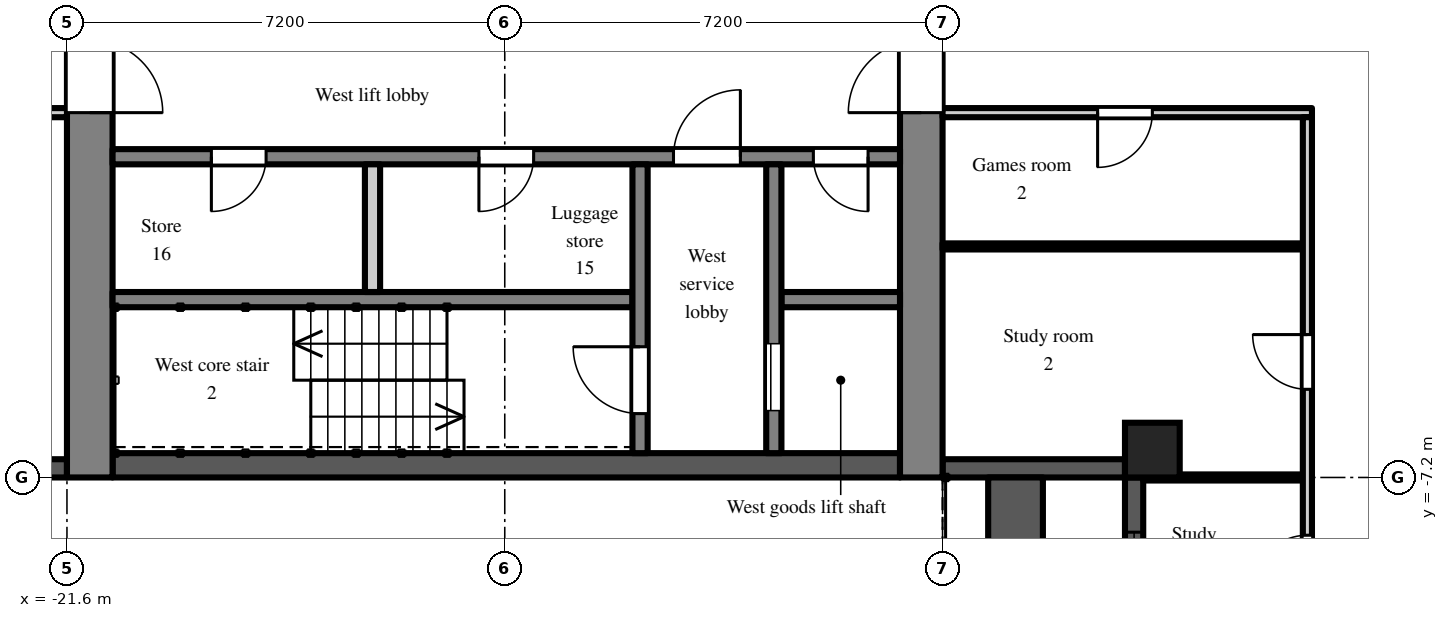
"""IFC4 building model, lengths in metres.
Left out: names, types, materials, properties, quantities, classifications, styles, units other than length and angle.
Written with IfcOpenShell. Run it as: python <this file> out.ifc"""

import sys

from ifc_helpers import new_model, si_unit, direction, frame, frame_2d, origin, origin_2d, place, context, subcontext, project, spatial, rectangle, extrude, element, fill, save


model = new_model("IFC4")
c1 = context("Model", 3, precision=1e-05, world=origin(), true_north=direction((0.0, 1.0)))
c2 = subcontext(c1, "Body", "Model", "MODEL_VIEW")
j1 = project(units=[si_unit("LENGTHUNIT", "METRE"), si_unit("PLANEANGLEUNIT", "RADIAN")], contexts=[c1])
p1 = place(None, origin())
s1 = spatial("IfcSite", under=j1, at=p1, CompositionType="ELEMENT")
p2 = place(p1, origin())
s2 = spatial("IfcBuilding", under=s1, at=p2, CompositionType="ELEMENT")
p3 = place(p2, frame((0.0, 0.0, 198.9)))
s3 = spatial("IfcBuildingStorey", under=s2, at=p3, CompositionType="ELEMENT", Elevation=198.9)
p4 = place(p3, frame((-3.75, -6.75, 0.0), z_axis=(0.0, 0.0, 1.0), x_axis=(1.0, 0.0, 0.0)))
e1 = element("IfcColumn", 1, at=p4, inside=s3, PredefinedType="COLUMN", context=c2, shape_type="SweptSolid", body=[
    extrude(rectangle(XDim=0.9, YDim=0.9, at=origin_2d()), origin(), (0.0, 0.0, 1.0), 3.0),
])
p5 = place(p3, frame((-24.3, -7.05, 0.0), z_axis=(0.0, 0.0, 1.0), x_axis=(1.0, 0.0, 0.0)))
e2 = element("IfcWall", 2, at=p5, inside=s3, PredefinedType="SOLIDWALL", context=c2, shape_type="SweptSolid", body=[
    extrude(rectangle(XDim=2.7, YDim=0.3, at=frame_2d((1.35, 0.0))), origin(), (0.0, 0.0, 1.0), 2.3),
])
p6 = place(p5, frame((0.75, 0.0, 0.2)))
e3 = element("IfcOpeningElement", 3, at=p6, cuts=e2, PredefinedType="OPENING", context=c2, shape_type="SweptSolid", body=[
    extrude(rectangle(XDim=1.2, YDim=1.85, at=frame_2d((0.6, 0.925))), frame((0.0, 0.16, 0.0), z_axis=(0.0, -1.0, 0.0), x_axis=(1.0, 0.0, 0.0)), (0.0, 0.0, 1.0), 0.32),
])
p7 = place(p3, frame((-7.2, -7.05, 0.0), z_axis=(0.0, 0.0, 1.0), x_axis=(1.0, 0.0, 0.0)))
e4 = element("IfcWall", 4, at=p7, inside=s3, PredefinedType="SOLIDWALL", context=c2, shape_type="SweptSolid", body=[
    extrude(rectangle(XDim=3.0, YDim=0.3, at=frame_2d((1.5, 0.0))), origin(), (0.0, 0.0, 1.0), 2.3),
])
p8 = place(p3, frame((-4.05, -7.2, 0.0), z_axis=(0.0, 0.0, 1.0), x_axis=(0.0, -1.0, 0.0)))
e5 = element("IfcWall", 5, at=p8, inside=s3, PredefinedType="SOLIDWALL", context=c2, shape_type="SweptSolid", body=[
    extrude(rectangle(XDim=7.2, YDim=0.3, at=frame_2d((3.6, 0.0))), origin(), (0.0, 0.0, 1.0), 2.3),
])
p9 = place(p8, frame((3.0, 0.0, 0.0)))
e6 = element("IfcOpeningElement", 6, at=p9, cuts=e5, PredefinedType="OPENING", context=c2, shape_type="SweptSolid", body=[
    extrude(rectangle(XDim=1.2, YDim=2.05, at=frame_2d((0.6, 1.025))), frame((0.0, 0.16, 0.0), z_axis=(0.0, -1.0, 0.0), x_axis=(1.0, 0.0, 0.0)), (0.0, 0.0, 1.0), 0.32),
])
p10 = place(p8, frame((0.9, 0.0, 0.2)))
e7 = element("IfcOpeningElement", 7, at=p10, cuts=e5, PredefinedType="OPENING", context=c2, shape_type="SweptSolid", body=[
    extrude(rectangle(XDim=1.8, YDim=1.85, at=frame_2d((0.9, 0.925))), frame((0.0, 0.16, 0.0), z_axis=(0.0, -1.0, 0.0), x_axis=(1.0, 0.0, 0.0)), (0.0, 0.0, 1.0), 0.32),
])
p11 = place(p8, frame((4.5, 0.0, 0.2)))
e8 = element("IfcOpeningElement", 8, at=p11, cuts=e5, PredefinedType="OPENING", context=c2, shape_type="SweptSolid", body=[
    extrude(rectangle(XDim=1.8, YDim=1.85, at=frame_2d((0.9, 0.925))), frame((0.0, 0.16, 0.0), z_axis=(0.0, -1.0, 0.0), x_axis=(1.0, 0.0, 0.0)), (0.0, 0.0, 1.0), 0.32),
])
p12 = place(p3, frame((-6.0, -14.4, 0.0), z_axis=(0.0, 0.0, 1.0), x_axis=(0.0, 1.0, 0.0)))
e9 = element("IfcWall", 9, at=p12, inside=s3, PredefinedType="PARAPET", context=c2, shape_type="SweptSolid", body=[
    extrude(rectangle(XDim=7.2, YDim=0.9, at=frame_2d((3.6, 0.0))), origin(), (0.0, 0.0, 1.0), 0.8),
])
p13 = place(p3, frame((-7.55, -7.2, 0.0), z_axis=(0.0, 0.0, 1.0), x_axis=(0.0, 1.0, 0.0)))
e10 = element("IfcWall", 10, at=p13, inside=s3, PredefinedType="SHEAR", context=c2, shape_type="SweptSolid", body=[
    extrude(rectangle(XDim=14.4, YDim=0.7, at=frame_2d((7.2, 0.0))), origin(), (0.0, 0.0, 1.0), 2.6),
])
p14 = place(p13, frame((6.0, 0.0, 0.0)))
e11 = element("IfcOpeningElement", 11, at=p14, cuts=e10, PredefinedType="OPENING", context=c2, shape_type="SweptSolid", body=[
    extrude(rectangle(XDim=2.4, YDim=2.2, at=frame_2d((1.2, 1.1))), frame((0.0, 0.36, 0.0), z_axis=(0.0, -1.0, 0.0), x_axis=(1.0, 0.0, 0.0)), (0.0, 0.0, 1.0), 0.72),
])
p15 = place(p3, frame((-21.225, -7.2, 0.0), z_axis=(0.0, 0.0, 1.0), x_axis=(0.0, 1.0, 0.0)))
e12 = element("IfcWall", 12, at=p15, inside=s3, PredefinedType="SHEAR", context=c2, shape_type="SweptSolid", body=[
    extrude(rectangle(XDim=14.4, YDim=0.75, at=frame_2d((7.2, 0.0))), origin(), (0.0, 0.0, 1.0), 2.6),
])
p16 = place(p15, frame((6.0, 0.0, 0.0)))
e13 = element("IfcOpeningElement", 13, at=p16, cuts=e12, PredefinedType="OPENING", context=c2, shape_type="SweptSolid", body=[
    extrude(rectangle(XDim=2.4, YDim=2.2, at=frame_2d((1.2, 1.1))), frame((0.0, 0.385, 0.0), z_axis=(0.0, -1.0, 0.0), x_axis=(1.0, 0.0, 0.0)), (0.0, 0.0, 1.0), 0.77),
])
p17 = place(p3, frame((-7.9, -7.0, 0.0), z_axis=(0.0, 0.0, 1.0), x_axis=(-1.0, 0.0, 0.0)))
e14 = element("IfcWall", 14, at=p17, inside=s3, PredefinedType="SHEAR", context=c2, shape_type="SweptSolid", body=[
    extrude(rectangle(XDim=12.95, YDim=0.4, at=frame_2d((6.475, 0.0))), origin(), (0.0, 0.0, 1.0), 2.6),
])
p18 = place(p3, frame((-7.9, -1.925, 0.0), z_axis=(0.0, 0.0, 1.0), x_axis=(-1.0, 0.0, 0.0)))
e15 = element("IfcWall", 15, at=p18, inside=s3, PredefinedType="SHEAR", context=c2, shape_type="SweptSolid", body=[
    extrude(rectangle(XDim=12.95, YDim=0.25, at=frame_2d((6.475, 0.0))), origin(), (0.0, 0.0, 1.0), 2.6),
])
p19 = place(p18, frame((0.525, 0.0, 0.0)))
e16 = element("IfcOpeningElement", 16, at=p19, cuts=e15, PredefinedType="OPENING", context=c2, shape_type="SweptSolid", body=[
    extrude(rectangle(XDim=0.9, YDim=2.1, at=frame_2d((0.45, 1.05))), frame((0.0, 0.135, 0.0), z_axis=(0.0, -1.0, 0.0), x_axis=(1.0, 0.0, 0.0)), (0.0, 0.0, 1.0), 0.27),
])
p20 = place(p18, frame((2.625, 0.0, 0.0)))
e17 = element("IfcOpeningElement", 17, at=p20, cuts=e15, PredefinedType="OPENING", context=c2, shape_type="SweptSolid", body=[
    extrude(rectangle(XDim=1.1, YDim=2.1, at=frame_2d((0.55, 1.05))), frame((0.0, 0.135, 0.0), z_axis=(0.0, -1.0, 0.0), x_axis=(1.0, 0.0, 0.0)), (0.0, 0.0, 1.0), 0.27),
])
p21 = place(p18, frame((6.025, 0.0, 0.0)))
e18 = element("IfcOpeningElement", 18, at=p21, cuts=e15, PredefinedType="OPENING", context=c2, shape_type="SweptSolid", body=[
    extrude(rectangle(XDim=0.9, YDim=2.1, at=frame_2d((0.45, 1.05))), frame((0.0, 0.135, 0.0), z_axis=(0.0, -1.0, 0.0), x_axis=(1.0, 0.0, 0.0)), (0.0, 0.0, 1.0), 0.27),
])
p22 = place(p18, frame((10.425, 0.0, 0.0)))
e19 = element("IfcOpeningElement", 19, at=p22, cuts=e15, PredefinedType="OPENING", context=c2, shape_type="SweptSolid", body=[
    extrude(rectangle(XDim=0.9, YDim=2.1, at=frame_2d((0.45, 1.05))), frame((0.0, 0.135, 0.0), z_axis=(0.0, -1.0, 0.0), x_axis=(1.0, 0.0, 0.0)), (0.0, 0.0, 1.0), 0.27),
])
p23 = place(p3, frame((-7.9, -4.275, 0.0), z_axis=(0.0, 0.0, 1.0), x_axis=(-1.0, 0.0, 0.0)))
e20 = element("IfcWall", 20, at=p23, inside=s3, PredefinedType="SHEAR", context=c2, shape_type="SweptSolid", body=[
    extrude(rectangle(XDim=1.95, YDim=0.25, at=frame_2d((0.975, 0.0))), origin(), (0.0, 0.0, 1.0), 2.6),
])
p24 = place(p3, frame((-12.3, -4.275, 0.0), z_axis=(0.0, 0.0, 1.0), x_axis=(-1.0, 0.0, 0.0)))
e21 = element("IfcWall", 21, at=p24, inside=s3, PredefinedType="SHEAR", context=c2, shape_type="SweptSolid", body=[
    extrude(rectangle(XDim=8.55, YDim=0.25, at=frame_2d((4.275, 0.0))), origin(), (0.0, 0.0, 1.0), 2.6),
])
p25 = place(p3, frame((-9.975, -2.05, 0.0), z_axis=(0.0, 0.0, 1.0), x_axis=(0.0, -1.0, 0.0)))
e22 = element("IfcWall", 22, at=p25, inside=s3, PredefinedType="SHEAR", context=c2, shape_type="SweptSolid", body=[
    extrude(rectangle(XDim=4.75, YDim=0.25, at=frame_2d((2.375, 0.0))), origin(), (0.0, 0.0, 1.0), 2.6),
])
p26 = place(p25, frame((2.95, 0.0, 0.0)))
e23 = element("IfcOpeningElement", 23, at=p26, cuts=e22, PredefinedType="OPENING", context=c2, shape_type="SweptSolid", body=[
    extrude(rectangle(XDim=1.1, YDim=2.1, at=frame_2d((0.55, 1.05))), frame((0.0, 0.135, 0.0), z_axis=(0.0, -1.0, 0.0), x_axis=(1.0, 0.0, 0.0)), (0.0, 0.0, 1.0), 0.27),
])
p27 = place(p3, frame((-12.175, -2.05, 0.0), z_axis=(0.0, 0.0, 1.0), x_axis=(0.0, -1.0, 0.0)))
e24 = element("IfcWall", 24, at=p27, inside=s3, PredefinedType="SHEAR", context=c2, shape_type="SweptSolid", body=[
    extrude(rectangle(XDim=4.75, YDim=0.25, at=frame_2d((2.375, 0.0))), origin(), (0.0, 0.0, 1.0), 2.6),
])
p28 = place(p27, frame((3.0, 0.0, 0.0)))
e25 = element("IfcOpeningElement", 25, at=p28, cuts=e24, PredefinedType="OPENING", context=c2, shape_type="SweptSolid", body=[
    extrude(rectangle(XDim=1.1, YDim=2.1, at=frame_2d((0.55, 1.05))), frame((0.0, 0.135, 0.0), z_axis=(0.0, -1.0, 0.0), x_axis=(1.0, 0.0, 0.0)), (0.0, 0.0, 1.0), 0.27),
])
p29 = place(p3, frame((-16.575, -2.05, 0.0), z_axis=(0.0, 0.0, 1.0), x_axis=(0.0, -1.0, 0.0)))
e26 = element("IfcWall", 26, at=p29, inside=s3, PredefinedType="PARTITIONING", context=c2, shape_type="SweptSolid", body=[
    extrude(rectangle(XDim=2.1, YDim=0.25, at=frame_2d((1.05, 0.0))), origin(), (0.0, 0.0, 1.0), 2.6),
])
p30 = place(p3, frame((-25.125, -1.2, 0.0), z_axis=(0.0, 0.0, 1.0), x_axis=(1.0, 0.0, 0.0)))
e27 = element("IfcWall", 27, at=p30, inside=s3, PredefinedType="PARTITIONING", context=c2, shape_type="SweptSolid", body=[
    extrude(rectangle(XDim=3.525, YDim=0.15, at=frame_2d((1.762, 0.0))), origin(), (0.0, 0.0, 1.0), 2.6),
])
p31 = place(p30, frame((1.925, 0.0, 0.0)))
e28 = element("IfcOpeningElement", 28, at=p31, cuts=e27, PredefinedType="OPENING", context=c2, shape_type="SweptSolid", body=[
    extrude(rectangle(XDim=1.0, YDim=2.1, at=frame_2d((0.5, 1.05))), frame((0.0, 0.085, 0.0), z_axis=(0.0, -1.0, 0.0), x_axis=(1.0, 0.0, 0.0)), (0.0, 0.0, 1.0), 0.17),
])
p32 = place(p3, frame((-7.2, -3.4, 0.0), z_axis=(0.0, 0.0, 1.0), x_axis=(1.0, 0.0, 0.0)))
e29 = element("IfcWall", 29, at=p32, inside=s3, PredefinedType="PARTITIONING", context=c2, shape_type="SweptSolid", body=[
    extrude(rectangle(XDim=5.925, YDim=0.1, at=frame_2d((2.962, 0.0))), origin(), (0.0, 0.0, 1.0), 2.6),
])
p33 = place(p3, frame((-7.2, -1.2, 0.0), z_axis=(0.0, 0.0, 1.0), x_axis=(1.0, 0.0, 0.0)))
e30 = element("IfcWall", 30, at=p33, inside=s3, PredefinedType="PARTITIONING", context=c2, shape_type="SweptSolid", body=[
    extrude(rectangle(XDim=6.075, YDim=0.15, at=frame_2d((3.038, 0.0))), origin(), (0.0, 0.0, 1.0), 2.6),
])
p34 = place(p33, frame((2.55, 0.0, 0.0)))
e31 = element("IfcOpeningElement", 31, at=p34, cuts=e30, PredefinedType="OPENING", context=c2, shape_type="SweptSolid", body=[
    extrude(rectangle(XDim=0.9, YDim=2.1, at=frame_2d((0.45, 1.05))), frame((0.0, 0.085, 0.0), z_axis=(0.0, -1.0, 0.0), x_axis=(1.0, 0.0, 0.0)), (0.0, 0.0, 1.0), 0.17),
])
p35 = place(p3, frame((-3.9, -7.2, 0.0), z_axis=(0.0, 0.0, 1.0), x_axis=(1.0, 0.0, 0.0)))
e32 = element("IfcWall", 32, at=p35, inside=s3, PredefinedType="PARTITIONING", context=c2, shape_type="SweptSolid", body=[
    extrude(rectangle(XDim=2.625, YDim=0.1, at=frame_2d((1.312, 0.0))), origin(), (0.0, 0.0, 1.0), 2.6),
])
p36 = place(p3, frame((-1.2, -17.925, 0.0), z_axis=(0.0, 0.0, 1.0), x_axis=(0.0, 1.0, 0.0)))
e33 = element("IfcWall", 33, at=p36, inside=s3, PredefinedType="PARTITIONING", context=c2, shape_type="SweptSolid", body=[
    extrude(rectangle(XDim=16.65, YDim=0.15, at=frame_2d((8.325, 0.0))), origin(), (0.0, 0.0, 1.0), 2.6),
])
p37 = place(p36, frame((12.175, 0.0, 0.0)))
e34 = element("IfcOpeningElement", 34, at=p37, cuts=e33, PredefinedType="OPENING", context=c2, shape_type="SweptSolid", body=[
    extrude(rectangle(XDim=0.9, YDim=2.1, at=frame_2d((0.45, 1.05))), frame((0.0, 0.085, 0.0), z_axis=(0.0, -1.0, 0.0), x_axis=(1.0, 0.0, 0.0)), (0.0, 0.0, 1.0), 0.17),
])
p38 = place(p36, frame((8.875, 0.0, 0.0)))
e35 = element("IfcOpeningElement", 35, at=p38, cuts=e33, PredefinedType="OPENING", context=c2, shape_type="SweptSolid", body=[
    extrude(rectangle(XDim=0.9, YDim=2.1, at=frame_2d((0.45, 1.05))), frame((0.0, 0.085, 0.0), z_axis=(0.0, -1.0, 0.0), x_axis=(1.0, 0.0, 0.0)), (0.0, 0.0, 1.0), 0.17),
])
p39 = place(p36, frame((5.275, 0.0, 0.0)))
e36 = element("IfcOpeningElement", 36, at=p39, cuts=e33, PredefinedType="OPENING", context=c2, shape_type="SweptSolid", body=[
    extrude(rectangle(XDim=0.9, YDim=2.1, at=frame_2d((0.45, 1.05))), frame((0.0, 0.085, 0.0), z_axis=(0.0, -1.0, 0.0), x_axis=(1.0, 0.0, 0.0)), (0.0, 0.0, 1.0), 0.17),
])
p40 = place(p36, frame((2.325, 0.0, 0.0)))
e37 = element("IfcOpeningElement", 37, at=p40, cuts=e33, PredefinedType="OPENING", context=c2, shape_type="SweptSolid", body=[
    extrude(rectangle(XDim=1.0, YDim=2.1, at=frame_2d((0.5, 1.05))), frame((0.0, 0.085, 0.0), z_axis=(0.0, -1.0, 0.0), x_axis=(1.0, 0.0, 0.0)), (0.0, 0.0, 1.0), 0.17),
])
p41 = place(p10, origin())
e38 = element("IfcWindow", 38, at=p41, inside=s3, PartitioningType="SINGLE_PANEL", PredefinedType="WINDOW", context=c2, shape_type="SweptSolid", body=[
    extrude(rectangle(XDim=1.8, YDim=1.85, at=frame_2d((0.9, 0.925))), frame((0.0, 0.03, 0.0), z_axis=(0.0, -1.0, 0.0), x_axis=(1.0, 0.0, 0.0)), (0.0, 0.0, 1.0), 0.06),
])
fill(e7, e38)
p42 = place(p26, origin())
e39 = element("IfcDoor", 39, at=p42, inside=s3, OperationType="SLIDING_TO_LEFT", PredefinedType="DOOR", context=c2, shape_type="SweptSolid", body=[
    extrude(rectangle(XDim=1.1, YDim=2.1, at=frame_2d((0.55, 1.05))), frame((0.0, 0.025, 0.0), z_axis=(0.0, -1.0, 0.0), x_axis=(1.0, 0.0, 0.0)), (0.0, 0.0, 1.0), 0.05),
])
fill(e23, e39)
p43 = place(p28, frame((1.1, 0.0, 0.0), z_axis=(0.0, 0.0, 1.0), x_axis=(-1.0, 0.0, 0.0)))
e40 = element("IfcDoor", 40, at=p43, inside=s3, OperationType="SINGLE_SWING_RIGHT", PredefinedType="DOOR", context=c2, shape_type="SweptSolid", body=[
    extrude(rectangle(XDim=1.1, YDim=2.1, at=frame_2d((0.55, 1.05))), frame((0.0, 0.025, 0.0), z_axis=(0.0, -1.0, 0.0), x_axis=(1.0, 0.0, 0.0)), (0.0, 0.0, 1.0), 0.05),
])
fill(e25, e40)
p44 = place(p19, origin())
e41 = element("IfcDoor", 41, at=p44, inside=s3, OperationType="SINGLE_SWING_LEFT", PredefinedType="DOOR", context=c2, shape_type="SweptSolid", body=[
    extrude(rectangle(XDim=0.9, YDim=2.1, at=frame_2d((0.45, 1.05))), frame((0.0, 0.025, 0.0), z_axis=(0.0, -1.0, 0.0), x_axis=(1.0, 0.0, 0.0)), (0.0, 0.0, 1.0), 0.05),
])
fill(e16, e41)
p45 = place(p20, frame((1.1, 0.0, 0.0), z_axis=(0.0, 0.0, 1.0), x_axis=(-1.0, 0.0, 0.0)))
e42 = element("IfcDoor", 42, at=p45, inside=s3, OperationType="SINGLE_SWING_RIGHT", PredefinedType="DOOR", context=c2, shape_type="SweptSolid", body=[
    extrude(rectangle(XDim=1.1, YDim=2.1, at=frame_2d((0.55, 1.05))), frame((0.0, 0.025, 0.0), z_axis=(0.0, -1.0, 0.0), x_axis=(1.0, 0.0, 0.0)), (0.0, 0.0, 1.0), 0.05),
])
fill(e17, e42)
p46 = place(p14, origin())
e43 = element("IfcDoor", 43, at=p46, inside=s3, OperationType="DOUBLE_DOOR_DOUBLE_SWING", PredefinedType="DOOR", context=c2, shape_type="SweptSolid", body=[
    extrude(rectangle(XDim=2.4, YDim=2.2, at=frame_2d((1.2, 1.1))), frame((0.0, 0.025, 0.0), z_axis=(0.0, -1.0, 0.0), x_axis=(1.0, 0.0, 0.0)), (0.0, 0.0, 1.0), 0.05),
])
fill(e11, e43)
p47 = place(p16, frame((2.4, 0.0, 0.0), z_axis=(0.0, 0.0, 1.0), x_axis=(-1.0, 0.0, 0.0)))
e44 = element("IfcDoor", 44, at=p47, inside=s3, OperationType="DOUBLE_DOOR_DOUBLE_SWING", PredefinedType="DOOR", context=c2, shape_type="SweptSolid", body=[
    extrude(rectangle(XDim=2.4, YDim=2.2, at=frame_2d((1.2, 1.1))), frame((0.0, 0.025, 0.0), z_axis=(0.0, -1.0, 0.0), x_axis=(1.0, 0.0, 0.0)), (0.0, 0.0, 1.0), 0.05),
])
fill(e13, e44)
p48 = place(p21, origin())
e45 = element("IfcDoor", 45, at=p48, inside=s3, OperationType="SINGLE_SWING_RIGHT", PredefinedType="DOOR", context=c2, shape_type="SweptSolid", body=[
    extrude(rectangle(XDim=0.9, YDim=2.1, at=frame_2d((0.45, 1.05))), frame((0.0, 0.025, 0.0), z_axis=(0.0, -1.0, 0.0), x_axis=(1.0, 0.0, 0.0)), (0.0, 0.0, 1.0), 0.05),
])
fill(e18, e45)
p49 = place(p22, origin())
e46 = element("IfcDoor", 46, at=p49, inside=s3, OperationType="SINGLE_SWING_RIGHT", PredefinedType="DOOR", context=c2, shape_type="SweptSolid", body=[
    extrude(rectangle(XDim=0.9, YDim=2.1, at=frame_2d((0.45, 1.05))), frame((0.0, 0.025, 0.0), z_axis=(0.0, -1.0, 0.0), x_axis=(1.0, 0.0, 0.0)), (0.0, 0.0, 1.0), 0.05),
])
fill(e19, e46)
p50 = place(p34, frame((0.9, 0.0, 0.0), z_axis=(0.0, 0.0, 1.0), x_axis=(-1.0, 0.0, 0.0)))
e47 = element("IfcDoor", 47, at=p50, inside=s3, OperationType="SINGLE_SWING_RIGHT", PredefinedType="DOOR", context=c2, shape_type="SweptSolid", body=[
    extrude(rectangle(XDim=0.9, YDim=2.1, at=frame_2d((0.45, 1.05))), frame((0.0, 0.025, 0.0), z_axis=(0.0, -1.0, 0.0), x_axis=(1.0, 0.0, 0.0)), (0.0, 0.0, 1.0), 0.05),
])
fill(e31, e47)
p51 = place(p37, origin())
e48 = element("IfcDoor", 48, at=p51, inside=s3, OperationType="SINGLE_SWING_RIGHT", PredefinedType="DOOR", context=c2, shape_type="SweptSolid", body=[
    extrude(rectangle(XDim=0.9, YDim=2.1, at=frame_2d((0.45, 1.05))), frame((0.0, 0.025, 0.0), z_axis=(0.0, -1.0, 0.0), x_axis=(1.0, 0.0, 0.0)), (0.0, 0.0, 1.0), 0.05),
])
fill(e34, e48)
p52 = place(p38, origin())
e49 = element("IfcDoor", 49, at=p52, inside=s3, OperationType="SINGLE_SWING_LEFT", PredefinedType="DOOR", context=c2, shape_type="SweptSolid", body=[
    extrude(rectangle(XDim=0.9, YDim=2.1, at=frame_2d((0.45, 1.05))), frame((0.0, 0.025, 0.0), z_axis=(0.0, -1.0, 0.0), x_axis=(1.0, 0.0, 0.0)), (0.0, 0.0, 1.0), 0.05),
])
fill(e35, e49)
save(model, sys.argv[1])
